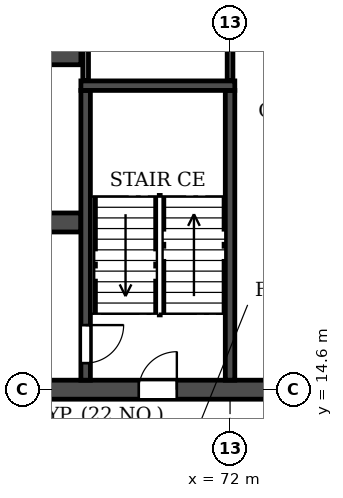
"""IFC4 building model, lengths in metres.
Left out: names, types, materials, properties, quantities, classifications, styles, units other than length and angle.
Written with IfcOpenShell. Run it as: python <this file> out.ifc"""

import sys

from ifc_helpers import new_model, si_unit, direction, frame, frame_2d, origin, place, context, subcontext, project, spatial, rectangle, extrude, element, fill, save


model = new_model("IFC4")
c1 = context("Model", 3, precision=1e-05, world=origin(), true_north=direction((0.0, 1.0)))
c2 = subcontext(c1, "Body", "Model", "MODEL_VIEW")
j1 = project(units=[si_unit("LENGTHUNIT", "METRE"), si_unit("PLANEANGLEUNIT", "RADIAN")], contexts=[c1])
p1 = place(None, origin())
s1 = spatial("IfcSite", under=j1, at=p1, CompositionType="ELEMENT")
p2 = place(p1, origin())
s2 = spatial("IfcBuilding", under=s1, at=p2, CompositionType="ELEMENT")
p3 = place(p2, frame((0.0, 0.0, 112.5)))
s3 = spatial("IfcBuildingStorey", under=s2, at=p3, CompositionType="ELEMENT", Elevation=112.5)
p4 = place(p3, frame((14.6, 14.6, 0.0), z_axis=(0.0, 0.0, 1.0), x_axis=(1.0, 0.0, 0.0)))
e1 = element("IfcWall", 1, at=p4, inside=s3, PredefinedType="SOLIDWALL", context=c2, shape_type="SweptSolid", body=[
    extrude(rectangle(XDim=72.8, YDim=0.5, at=frame_2d((36.4, 0.0))), origin(), (0.0, 0.0, 1.0), 2.95),
])
p5 = place(p4, frame((1.2, 0.0, 0.0)))
e2 = element("IfcOpeningElement", 2, at=p5, cuts=e1, PredefinedType="OPENING", context=c2, shape_type="SweptSolid", body=[
    extrude(rectangle(XDim=1.0, YDim=2.1, at=frame_2d((0.5, 1.05))), frame((0.0, 0.26, 0.0), z_axis=(0.0, -1.0, 0.0), x_axis=(1.0, 0.0, 0.0)), (0.0, 0.0, 1.0), 0.52),
])
p6 = place(p4, frame((4.3, 0.0, 0.0)))
e3 = element("IfcOpeningElement", 3, at=p6, cuts=e1, PredefinedType="OPENING", context=c2, shape_type="SweptSolid", body=[
    extrude(rectangle(XDim=1.0, YDim=2.1, at=frame_2d((0.5, 1.05))), frame((0.0, 0.26, 0.0), z_axis=(0.0, -1.0, 0.0), x_axis=(1.0, 0.0, 0.0)), (0.0, 0.0, 1.0), 0.52),
])
p7 = place(p4, frame((12.2, 0.0, 0.0)))
e4 = element("IfcOpeningElement", 4, at=p7, cuts=e1, PredefinedType="OPENING", context=c2, shape_type="SweptSolid", body=[
    extrude(rectangle(XDim=1.0, YDim=2.1, at=frame_2d((0.5, 1.05))), frame((0.0, 0.26, 0.0), z_axis=(0.0, -1.0, 0.0), x_axis=(1.0, 0.0, 0.0)), (0.0, 0.0, 1.0), 0.52),
])
p8 = place(p4, frame((16.8, 0.0, 0.0)))
e5 = element("IfcOpeningElement", 5, at=p8, cuts=e1, PredefinedType="OPENING", context=c2, shape_type="SweptSolid", body=[
    extrude(rectangle(XDim=1.0, YDim=2.1, at=frame_2d((0.5, 1.05))), frame((0.0, 0.26, 0.0), z_axis=(0.0, -1.0, 0.0), x_axis=(1.0, 0.0, 0.0)), (0.0, 0.0, 1.0), 0.52),
])
p9 = place(p4, frame((28.1, 0.0, 0.0)))
e6 = element("IfcOpeningElement", 6, at=p9, cuts=e1, PredefinedType="OPENING", context=c2, shape_type="SweptSolid", body=[
    extrude(rectangle(XDim=1.0, YDim=2.1, at=frame_2d((0.5, 1.05))), frame((0.0, 0.26, 0.0), z_axis=(0.0, -1.0, 0.0), x_axis=(1.0, 0.0, 0.0)), (0.0, 0.0, 1.0), 0.52),
])
p10 = place(p4, frame((32.0, 0.0, 0.0)))
e7 = element("IfcOpeningElement", 7, at=p10, cuts=e1, PredefinedType="OPENING", context=c2, shape_type="SweptSolid", body=[
    extrude(rectangle(XDim=1.0, YDim=2.1, at=frame_2d((0.5, 1.05))), frame((0.0, 0.26, 0.0), z_axis=(0.0, -1.0, 0.0), x_axis=(1.0, 0.0, 0.0)), (0.0, 0.0, 1.0), 0.52),
])
p11 = place(p4, frame((35.9, 0.0, 0.0)))
e8 = element("IfcOpeningElement", 8, at=p11, cuts=e1, PredefinedType="OPENING", context=c2, shape_type="SweptSolid", body=[
    extrude(rectangle(XDim=1.0, YDim=2.1, at=frame_2d((0.5, 1.05))), frame((0.0, 0.26, 0.0), z_axis=(0.0, -1.0, 0.0), x_axis=(1.0, 0.0, 0.0)), (0.0, 0.0, 1.0), 0.52),
])
p12 = place(p4, frame((39.8, 0.0, 0.0)))
e9 = element("IfcOpeningElement", 9, at=p12, cuts=e1, PredefinedType="OPENING", context=c2, shape_type="SweptSolid", body=[
    extrude(rectangle(XDim=1.0, YDim=2.1, at=frame_2d((0.5, 1.05))), frame((0.0, 0.26, 0.0), z_axis=(0.0, -1.0, 0.0), x_axis=(1.0, 0.0, 0.0)), (0.0, 0.0, 1.0), 0.52),
])
p13 = place(p4, frame((43.7, 0.0, 0.0)))
e10 = element("IfcOpeningElement", 10, at=p13, cuts=e1, PredefinedType="OPENING", context=c2, shape_type="SweptSolid", body=[
    extrude(rectangle(XDim=1.0, YDim=2.1, at=frame_2d((0.5, 1.05))), frame((0.0, 0.26, 0.0), z_axis=(0.0, -1.0, 0.0), x_axis=(1.0, 0.0, 0.0)), (0.0, 0.0, 1.0), 0.52),
])
p14 = place(p4, frame((55.0, 0.0, 0.0)))
e11 = element("IfcOpeningElement", 11, at=p14, cuts=e1, PredefinedType="OPENING", context=c2, shape_type="SweptSolid", body=[
    extrude(rectangle(XDim=1.0, YDim=2.1, at=frame_2d((0.5, 1.05))), frame((0.0, 0.26, 0.0), z_axis=(0.0, -1.0, 0.0), x_axis=(1.0, 0.0, 0.0)), (0.0, 0.0, 1.0), 0.52),
])
p15 = place(p4, frame((59.6, 0.0, 0.0)))
e12 = element("IfcOpeningElement", 12, at=p15, cuts=e1, PredefinedType="OPENING", context=c2, shape_type="SweptSolid", body=[
    extrude(rectangle(XDim=1.0, YDim=2.1, at=frame_2d((0.5, 1.05))), frame((0.0, 0.26, 0.0), z_axis=(0.0, -1.0, 0.0), x_axis=(1.0, 0.0, 0.0)), (0.0, 0.0, 1.0), 0.52),
])
p16 = place(p4, frame((67.5, 0.0, 0.0)))
e13 = element("IfcOpeningElement", 13, at=p16, cuts=e1, PredefinedType="OPENING", context=c2, shape_type="SweptSolid", body=[
    extrude(rectangle(XDim=1.0, YDim=2.1, at=frame_2d((0.5, 1.05))), frame((0.0, 0.26, 0.0), z_axis=(0.0, -1.0, 0.0), x_axis=(1.0, 0.0, 0.0)), (0.0, 0.0, 1.0), 0.52),
])
p17 = place(p4, frame((70.35, 0.0, 0.0)))
e14 = element("IfcOpeningElement", 14, at=p17, cuts=e1, PredefinedType="OPENING", context=c2, shape_type="SweptSolid", body=[
    extrude(rectangle(XDim=1.5, YDim=2.1, at=frame_2d((0.75, 1.05))), frame((0.0, 0.26, 0.0), z_axis=(0.0, -1.0, 0.0), x_axis=(1.0, 0.0, 0.0)), (0.0, 0.0, 1.0), 0.52),
])
p18 = place(p3, frame((33.925, 19.0, 0.0), z_axis=(0.0, 0.0, 1.0), x_axis=(1.0, 0.0, 0.0)))
e15 = element("IfcWall", 15, at=p18, inside=s3, PredefinedType="SOLIDWALL", context=c2, shape_type="SweptSolid", body=[
    extrude(rectangle(XDim=34.15, YDim=0.5, at=frame_2d((17.075, 0.0))), origin(), (0.0, 0.0, 1.0), 2.95),
])
p19 = place(p18, frame((16.175, 0.0, 0.0)))
e16 = element("IfcOpeningElement", 16, at=p19, cuts=e15, PredefinedType="OPENING", context=c2, shape_type="SweptSolid", body=[
    extrude(rectangle(XDim=1.8, YDim=2.1, at=frame_2d((0.9, 1.05))), frame((0.0, 0.26, 0.0), z_axis=(0.0, -1.0, 0.0), x_axis=(1.0, 0.0, 0.0)), (0.0, 0.0, 1.0), 0.52),
])
p20 = place(p18, frame((1.525, 0.0, 0.0)))
e17 = element("IfcOpeningElement", 17, at=p20, cuts=e15, PredefinedType="OPENING", context=c2, shape_type="SweptSolid", body=[
    extrude(rectangle(XDim=1.8, YDim=2.1, at=frame_2d((0.9, 1.05))), frame((0.0, 0.26, 0.0), z_axis=(0.0, -1.0, 0.0), x_axis=(1.0, 0.0, 0.0)), (0.0, 0.0, 1.0), 0.52),
])
p21 = place(p18, frame((8.725, 0.0, 0.0)))
e18 = element("IfcOpeningElement", 18, at=p21, cuts=e15, PredefinedType="OPENING", context=c2, shape_type="SweptSolid", body=[
    extrude(rectangle(XDim=1.1, YDim=2.1, at=frame_2d((0.55, 1.05))), frame((0.0, 0.26, 0.0), z_axis=(0.0, -1.0, 0.0), x_axis=(1.0, 0.0, 0.0)), (0.0, 0.0, 1.0), 0.52),
])
p22 = place(p18, frame((11.325, 0.0, 0.0)))
e19 = element("IfcOpeningElement", 19, at=p22, cuts=e15, PredefinedType="OPENING", context=c2, shape_type="SweptSolid", body=[
    extrude(rectangle(XDim=1.1, YDim=2.1, at=frame_2d((0.55, 1.05))), frame((0.0, 0.26, 0.0), z_axis=(0.0, -1.0, 0.0), x_axis=(1.0, 0.0, 0.0)), (0.0, 0.0, 1.0), 0.52),
])
p23 = place(p18, frame((13.925, 0.0, 0.0)))
e20 = element("IfcOpeningElement", 20, at=p23, cuts=e15, PredefinedType="OPENING", context=c2, shape_type="SweptSolid", body=[
    extrude(rectangle(XDim=1.1, YDim=2.1, at=frame_2d((0.55, 1.05))), frame((0.0, 0.26, 0.0), z_axis=(0.0, -1.0, 0.0), x_axis=(1.0, 0.0, 0.0)), (0.0, 0.0, 1.0), 0.52),
])
p24 = place(p18, frame((19.125, 0.0, 0.0)))
e21 = element("IfcOpeningElement", 21, at=p24, cuts=e15, PredefinedType="OPENING", context=c2, shape_type="SweptSolid", body=[
    extrude(rectangle(XDim=1.1, YDim=2.1, at=frame_2d((0.55, 1.05))), frame((0.0, 0.26, 0.0), z_axis=(0.0, -1.0, 0.0), x_axis=(1.0, 0.0, 0.0)), (0.0, 0.0, 1.0), 0.52),
])
p25 = place(p18, frame((21.725, 0.0, 0.0)))
e22 = element("IfcOpeningElement", 22, at=p25, cuts=e15, PredefinedType="OPENING", context=c2, shape_type="SweptSolid", body=[
    extrude(rectangle(XDim=1.1, YDim=2.1, at=frame_2d((0.55, 1.05))), frame((0.0, 0.26, 0.0), z_axis=(0.0, -1.0, 0.0), x_axis=(1.0, 0.0, 0.0)), (0.0, 0.0, 1.0), 0.52),
])
p26 = place(p18, frame((24.325, 0.0, 0.0)))
e23 = element("IfcOpeningElement", 23, at=p26, cuts=e15, PredefinedType="OPENING", context=c2, shape_type="SweptSolid", body=[
    extrude(rectangle(XDim=1.1, YDim=2.1, at=frame_2d((0.55, 1.05))), frame((0.0, 0.26, 0.0), z_axis=(0.0, -1.0, 0.0), x_axis=(1.0, 0.0, 0.0)), (0.0, 0.0, 1.0), 0.52),
])
p27 = place(p18, frame((30.825, 0.0, 0.0)))
e24 = element("IfcOpeningElement", 24, at=p27, cuts=e15, PredefinedType="OPENING", context=c2, shape_type="SweptSolid", body=[
    extrude(rectangle(XDim=1.8, YDim=2.1, at=frame_2d((0.9, 1.05))), frame((0.0, 0.26, 0.0), z_axis=(0.0, -1.0, 0.0), x_axis=(1.0, 0.0, 0.0)), (0.0, 0.0, 1.0), 0.52),
])
p28 = place(p3, frame((33.925, 23.4, 0.0), z_axis=(0.0, 0.0, 1.0), x_axis=(1.0, 0.0, 0.0)))
e25 = element("IfcWall", 25, at=p28, inside=s3, PredefinedType="SOLIDWALL", context=c2, shape_type="SweptSolid", body=[
    extrude(rectangle(XDim=34.15, YDim=0.5, at=frame_2d((17.075, 0.0))), origin(), (0.0, 0.0, 1.0), 2.95),
])
p29 = place(p28, frame((16.175, 0.0, 0.0)))
e26 = element("IfcOpeningElement", 26, at=p29, cuts=e25, PredefinedType="OPENING", context=c2, shape_type="SweptSolid", body=[
    extrude(rectangle(XDim=1.8, YDim=2.1, at=frame_2d((0.9, 1.05))), frame((0.0, 0.26, 0.0), z_axis=(0.0, -1.0, 0.0), x_axis=(1.0, 0.0, 0.0)), (0.0, 0.0, 1.0), 0.52),
])
p30 = place(p28, frame((11.025, 0.0, 0.0)))
e27 = element("IfcOpeningElement", 27, at=p30, cuts=e25, PredefinedType="OPENING", context=c2, shape_type="SweptSolid", body=[
    extrude(rectangle(XDim=1.1, YDim=2.1, at=frame_2d((0.55, 1.05))), frame((0.0, 0.26, 0.0), z_axis=(0.0, -1.0, 0.0), x_axis=(1.0, 0.0, 0.0)), (0.0, 0.0, 1.0), 0.52),
])
p31 = place(p3, frame((68.2, 14.85, 0.0), z_axis=(0.0, 0.0, 1.0), x_axis=(0.0, 1.0, 0.0)))
e28 = element("IfcWall", 28, at=p31, inside=s3, PredefinedType="SOLIDWALL", context=c2, shape_type="SweptSolid", body=[
    extrude(rectangle(XDim=7.625, YDim=0.25, at=frame_2d((3.812, 0.0))), origin(), (0.0, 0.0, 1.0), 2.95),
])
p32 = place(p31, frame((0.45, 0.0, 0.0)))
e29 = element("IfcOpeningElement", 29, at=p32, cuts=e28, PredefinedType="OPENING", context=c2, shape_type="SweptSolid", body=[
    extrude(rectangle(XDim=1.0, YDim=2.1, at=frame_2d((0.5, 1.05))), frame((0.0, 0.135, 0.0), z_axis=(0.0, -1.0, 0.0), x_axis=(1.0, 0.0, 0.0)), (0.0, 0.0, 1.0), 0.27),
])
p33 = place(p3, frame((72.0, 14.85, 0.0), z_axis=(0.0, 0.0, 1.0), x_axis=(0.0, 1.0, 0.0)))
e30 = element("IfcWall", 30, at=p33, inside=s3, PredefinedType="SOLIDWALL", context=c2, shape_type="SweptSolid", body=[
    extrude(rectangle(XDim=7.625, YDim=0.25, at=frame_2d((3.812, 0.0))), origin(), (0.0, 0.0, 1.0), 2.95),
])
p34 = place(p3, frame((68.075, 22.6, 0.0), z_axis=(0.0, 0.0, 1.0), x_axis=(1.0, 0.0, 0.0)))
e31 = element("IfcWall", 31, at=p34, inside=s3, PredefinedType="SOLIDWALL", context=c2, shape_type="SweptSolid", body=[
    extrude(rectangle(XDim=4.05, YDim=0.25, at=frame_2d((2.025, 0.0))), origin(), (0.0, 0.0, 1.0), 2.95),
])
for number, where, z_axis, x_axis in (
    (32, (68.2, 22.735, 0.0), (0.0, 0.0, 1.0), (0.0, 1.0, 0.0)),
    (33, (72.0, 22.735, 0.0), (0.0, 0.0, 1.0), (0.0, 1.0, 0.0)),
):
    element("IfcWall", number, at=place(p3, frame(where, z_axis=z_axis, x_axis=x_axis)), inside=s3, PredefinedType="PARTITIONING", context=c2, shape_type="SweptSolid", body=[
        extrude(rectangle(XDim=4.805, YDim=0.15, at=frame_2d((2.402, 0.0))), origin(), (0.0, 0.0, 1.0), 2.95),
    ])
p35 = place(p14, origin())
e34 = element("IfcDoor", 34, at=p35, inside=s3, OperationType="SINGLE_SWING_RIGHT", PredefinedType="DOOR", context=c2, shape_type="SweptSolid", body=[
    extrude(rectangle(XDim=1.0, YDim=2.1, at=frame_2d((0.5, 1.05))), frame((0.0, 0.025, 0.0), z_axis=(0.0, -1.0, 0.0), x_axis=(1.0, 0.0, 0.0)), (0.0, 0.0, 1.0), 0.05),
])
fill(e11, e34)
p36 = place(p32, frame((1.0, 0.0, 0.0), z_axis=(0.0, 0.0, 1.0), x_axis=(-1.0, 0.0, 0.0)))
e35 = element("IfcDoor", 35, at=p36, inside=s3, OperationType="SINGLE_SWING_LEFT", PredefinedType="DOOR", context=c2, shape_type="SweptSolid", body=[
    extrude(rectangle(XDim=1.0, YDim=2.1, at=frame_2d((0.5, 1.05))), frame((0.0, 0.025, 0.0), z_axis=(0.0, -1.0, 0.0), x_axis=(1.0, 0.0, 0.0)), (0.0, 0.0, 1.0), 0.05),
])
fill(e29, e35)
save(model, sys.argv[1])
